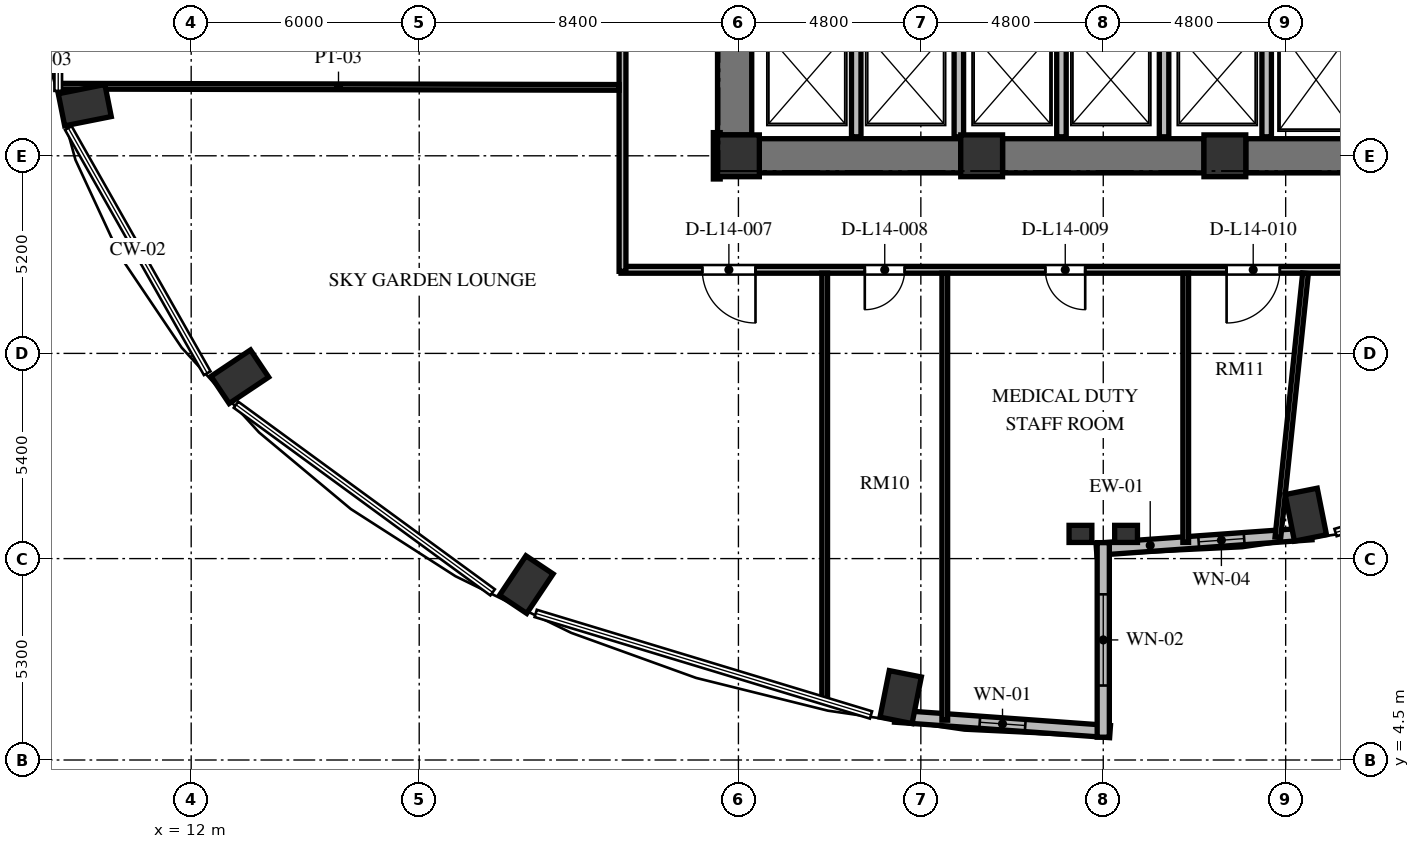
"""IFC4 building model, lengths in metres.
Left out: names, types, materials, properties, quantities, classifications, styles, units other than length and angle.
Written with IfcOpenShell. Run it as: python <this file> out.ifc"""

import sys

from ifc_helpers import new_model, si_unit, direction, frame, frame_2d, origin, origin_2d, place, context, subcontext, project, spatial, rectangle, extrude, element, fill, save


model = new_model("IFC4")
c1 = context("Model", 3, precision=1e-05, world=origin(), true_north=direction((0.0, 1.0)))
c2 = subcontext(c1, "Body", "Model", "MODEL_VIEW")
j1 = project(units=[si_unit("LENGTHUNIT", "METRE"), si_unit("PLANEANGLEUNIT", "RADIAN")], contexts=[c1])
p1 = place(None, origin())
s1 = spatial("IfcSite", under=j1, at=p1, CompositionType="ELEMENT")
p2 = place(p1, origin())
s2 = spatial("IfcBuilding", under=s1, at=p2, CompositionType="ELEMENT")
p3 = place(p2, frame((0.0, 0.0, 58.032)))
s3 = spatial("IfcBuildingStorey", under=s2, at=p3, CompositionType="ELEMENT", Elevation=58.032)
for number, where, z_axis, x_axis in (
    (1, (41.331, 10.956, 0.0), (0.0, 0.0, 1.0), (0.195, -0.981, 0.0)),
    (2, (9.2, 21.732, 0.0), (0.0, 0.0, 1.0), (-0.981, -0.195, 0.0)),
    (3, (13.28, 14.586, 0.0), (0.0, 0.0, 1.0), (-0.831, -0.556, 0.0)),
    (4, (20.819, 9.116, 0.0), (0.0, 0.0, 1.0), (-0.556, -0.831, 0.0)),
    (5, (30.669, 6.156, 0.0), (0.0, 0.0, 1.0), (-0.195, -0.981, 0.0)),
):
    element("IfcColumn", number, at=place(p3, frame(where, z_axis=z_axis, x_axis=x_axis)), inside=s3, PredefinedType="COLUMN", context=c2, shape_type="SweptSolid", body=[
        extrude(rectangle(XDim=1.25, YDim=0.86, at=origin_2d()), origin(), (0.0, 0.0, 1.0), 3.648),
    ])
for number, where, z_axis, x_axis in (
    (6, (26.4, 20.4, 0.0), (0.0, 0.0, 1.0), (1.0, 0.0, 0.0)),
    (7, (32.8, 20.4, 0.0), (0.0, 0.0, 1.0), (1.0, 0.0, 0.0)),
    (8, (39.2, 20.4, 0.0), (0.0, 0.0, 1.0), (1.0, 0.0, 0.0)),
):
    element("IfcColumn", number, at=place(p3, frame(where, z_axis=z_axis, x_axis=x_axis)), inside=s3, PredefinedType="COLUMN", context=c2, shape_type="SweptSolid", body=[
        extrude(rectangle(XDim=1.1, YDim=1.1, at=origin_2d()), origin(), (0.0, 0.0, 1.0), 3.648),
    ])
for number, where, z_axis, x_axis in (
    (9, (35.4, 10.45, 0.0), (0.0, 0.0, 1.0), (1.0, 0.0, 0.0)),
    (10, (36.6, 10.45, 0.0), (0.0, 0.0, 1.0), (1.0, 0.0, 0.0)),
):
    element("IfcColumn", number, at=place(p3, frame(where, z_axis=z_axis, x_axis=x_axis)), inside=s3, PredefinedType="PILASTER", context=c2, shape_type="SweptSolid", body=[
        extrude(rectangle(XDim=0.6, YDim=0.45, at=origin_2d()), origin(), (0.0, 0.0, 1.0), 3.648),
    ])
p4 = place(p3, frame((26.3, 20.95, 0.0), z_axis=(0.0, 0.0, 1.0), x_axis=(0.0, 1.0, 0.0)))
e11 = element("IfcWall", 11, at=p4, inside=s3, PredefinedType="SHEAR", context=c2, shape_type="SweptSolid", body=[
    extrude(rectangle(XDim=14.1, YDim=0.9, at=frame_2d((7.05, 0.0))), origin(), (0.0, 0.0, 1.0), 3.648),
])
p5 = place(p4, frame((6.5, 0.0, 0.0)))
e12 = element("IfcOpeningElement", 12, at=p5, cuts=e11, PredefinedType="OPENING", context=c2, shape_type="SweptSolid", body=[
    extrude(rectangle(XDim=1.2, YDim=2.15, at=frame_2d((0.6, 1.075))), frame((0.0, 0.46, 0.0), z_axis=(0.0, -1.0, 0.0), x_axis=(1.0, 0.0, 0.0)), (0.0, 0.0, 1.0), 0.92),
])
p6 = place(p4, frame((9.6, 0.0, 0.0)))
e13 = element("IfcOpeningElement", 13, at=p6, cuts=e11, PredefinedType="OPENING", context=c2, shape_type="SweptSolid", body=[
    extrude(rectangle(XDim=1.3, YDim=2.2, at=frame_2d((0.65, 1.1))), frame((0.0, 0.46, 0.0), z_axis=(0.0, -1.0, 0.0), x_axis=(1.0, 0.0, 0.0)), (0.0, 0.0, 1.0), 0.92),
])
p7 = place(p4, frame((3.26, 0.0, 0.0)))
e14 = element("IfcOpeningElement", 14, at=p7, cuts=e11, PredefinedType="OPENING", context=c2, shape_type="SweptSolid", body=[
    extrude(rectangle(XDim=1.3, YDim=2.2, at=frame_2d((0.65, 1.1))), frame((0.0, 0.46, 0.0), z_axis=(0.0, -1.0, 0.0), x_axis=(1.0, 0.0, 0.0)), (0.0, 0.0, 1.0), 0.92),
])
p8 = place(p3, frame((26.95, 20.4, 0.0), z_axis=(0.0, 0.0, 1.0), x_axis=(1.0, 0.0, 0.0)))
e15 = element("IfcWall", 15, at=p8, inside=s3, PredefinedType="SHEAR", context=c2, shape_type="SweptSolid", body=[
    extrude(rectangle(XDim=5.3, YDim=0.9, at=frame_2d((2.65, 0.0))), origin(), (0.0, 0.0, 1.0), 3.648),
])
p9 = place(p3, frame((33.35, 20.4, 0.0), z_axis=(0.0, 0.0, 1.0), x_axis=(1.0, 0.0, 0.0)))
e16 = element("IfcWall", 16, at=p9, inside=s3, PredefinedType="SHEAR", context=c2, shape_type="SweptSolid", body=[
    extrude(rectangle(XDim=5.3, YDim=0.9, at=frame_2d((2.65, 0.0))), origin(), (0.0, 0.0, 1.0), 3.648),
])
p10 = place(p3, frame((39.75, 20.4, 0.0), z_axis=(0.0, 0.0, 1.0), x_axis=(1.0, 0.0, 0.0)))
e17 = element("IfcWall", 17, at=p10, inside=s3, PredefinedType="SHEAR", context=c2, shape_type="SweptSolid", body=[
    extrude(rectangle(XDim=5.3, YDim=0.9, at=frame_2d((2.65, 0.0))), origin(), (0.0, 0.0, 1.0), 3.648),
])
p11 = place(p3, frame((35.821, 10.047, 0.0), z_axis=(0.0, 0.0, 1.0), x_axis=(0.997422321809, 0.071754525696, 0.0)))
e18 = element("IfcWall", 18, at=p11, inside=s3, PredefinedType="SOLIDWALL", context=c2, shape_type="SweptSolid", body=[
    extrude(rectangle(XDim=5.675, YDim=0.32, at=frame_2d((2.838, 0.0))), origin(), (0.0, 0.0, 1.0), 3.428),
])
p12 = place(p11, frame((2.697, 0.0, 0.85)))
e19 = element("IfcOpeningElement", 19, at=p12, cuts=e18, PredefinedType="OPENING", context=c2, shape_type="SweptSolid", body=[
    extrude(rectangle(XDim=1.2, YDim=1.8, at=frame_2d((0.6, 0.9))), frame((0.0, 0.17, 0.0), z_axis=(0.0, -1.0, 0.0), x_axis=(1.0, 0.0, 0.0)), (0.0, 0.0, 1.0), 0.34),
])
p13 = place(p3, frame((30.519, 5.654, 0.0), z_axis=(0.0, 0.0, 1.0), x_axis=(0.997421878774, -0.071760683825, 0.0)))
e20 = element("IfcWall", 20, at=p13, inside=s3, PredefinedType="SOLIDWALL", context=c2, shape_type="SweptSolid", body=[
    extrude(rectangle(XDim=5.675, YDim=0.32, at=frame_2d((2.837, 0.0))), origin(), (0.0, 0.0, 1.0), 3.428),
])
p14 = place(p13, frame((2.237, 0.0, 0.85)))
e21 = element("IfcOpeningElement", 21, at=p14, cuts=e20, PredefinedType="OPENING", context=c2, shape_type="SweptSolid", body=[
    extrude(rectangle(XDim=1.2, YDim=2.2, at=frame_2d((0.6, 1.1))), frame((0.0, 0.17, 0.0), z_axis=(0.0, -1.0, 0.0), x_axis=(1.0, 0.0, 0.0)), (0.0, 0.0, 1.0), 0.34),
])
p15 = place(p3, frame((36.0, 5.1, 0.0), z_axis=(0.0, 0.0, 1.0), x_axis=(0.0, 1.0, 0.0)))
e22 = element("IfcWall", 22, at=p15, inside=s3, PredefinedType="SOLIDWALL", context=c2, shape_type="SweptSolid", body=[
    extrude(rectangle(XDim=5.12, YDim=0.32, at=frame_2d((2.56, 0.0))), origin(), (0.0, 0.0, 1.0), 3.428),
])
p16 = place(p15, frame((1.36, 0.0, 0.84)))
e23 = element("IfcOpeningElement", 23, at=p16, cuts=e22, PredefinedType="OPENING", context=c2, shape_type="SweptSolid", body=[
    extrude(rectangle(XDim=2.4, YDim=2.04, at=frame_2d((1.2, 1.02))), frame((0.0, 0.17, 0.0), z_axis=(0.0, -1.0, 0.0), x_axis=(1.0, 0.0, 0.0)), (0.0, 0.0, 1.0), 0.34),
])
for number, where, z_axis, x_axis in (
    (24, (29.5, 20.9, 0.0), (0.0, 0.0, 1.0), (0.0, 1.0, 0.0)),
    (25, (32.2, 20.9, 0.0), (0.0, 0.0, 1.0), (0.0, 1.0, 0.0)),
    (26, (34.9, 20.9, 0.0), (0.0, 0.0, 1.0), (0.0, 1.0, 0.0)),
    (27, (37.6, 20.9, 0.0), (0.0, 0.0, 1.0), (0.0, 1.0, 0.0)),
    (28, (40.3, 20.9, 0.0), (0.0, 0.0, 1.0), (0.0, 1.0, 0.0)),
):
    element("IfcWall", number, at=place(p3, frame(where, z_axis=z_axis, x_axis=x_axis)), inside=s3, PredefinedType="SOLIDWALL", context=c2, shape_type="SweptSolid", body=[
        extrude(rectangle(XDim=2.8, YDim=0.25, at=frame_2d((1.4, 0.0))), origin(), (0.0, 0.0, 1.0), 3.428),
    ])
p17 = place(p3, frame((25.83, 21.01, 0.0), z_axis=(0.0, 0.0, 1.0), x_axis=(0.0, -1.0, 0.0)))
e29 = element("IfcWall", 29, at=p17, inside=s3, PredefinedType="PARTITIONING", context=c2, shape_type="SweptSolid", body=[
    extrude(rectangle(XDim=1.22, YDim=0.18, at=frame_2d((0.61, 0.0))), origin(), (0.0, 0.0, 1.0), 3.428),
])
p18 = place(p3, frame((45.24, 17.4, 0.0), z_axis=(0.0, 0.0, 1.0), x_axis=(-1.0, 0.0, 0.0)))
e30 = element("IfcWall", 30, at=p18, inside=s3, PredefinedType="PARTITIONING", context=c2, shape_type="SweptSolid", body=[
    extrude(rectangle(XDim=21.93, YDim=0.18, at=frame_2d((10.965, 0.0))), origin(), (0.0, 0.0, 1.0), 3.053),
])
p19 = place(p18, frame((18.391, 0.0, 0.0)))
e31 = element("IfcOpeningElement", 31, at=p19, cuts=e30, PredefinedType="OPENING", context=c2, shape_type="SweptSolid", body=[
    extrude(rectangle(XDim=1.4, YDim=2.2, at=frame_2d((0.7, 1.1))), frame((0.0, 0.1, 0.0), z_axis=(0.0, -1.0, 0.0), x_axis=(1.0, 0.0, 0.0)), (0.0, 0.0, 1.0), 0.2),
])
p20 = place(p18, frame((14.465, 0.0, 0.0)))
e32 = element("IfcOpeningElement", 32, at=p20, cuts=e30, PredefinedType="OPENING", context=c2, shape_type="SweptSolid", body=[
    extrude(rectangle(XDim=1.05, YDim=2.15, at=frame_2d((0.525, 1.075))), frame((0.0, 0.1, 0.0), z_axis=(0.0, -1.0, 0.0), x_axis=(1.0, 0.0, 0.0)), (0.0, 0.0, 1.0), 0.2),
])
p21 = place(p18, frame((9.715, 0.0, 0.0)))
e33 = element("IfcOpeningElement", 33, at=p21, cuts=e30, PredefinedType="OPENING", context=c2, shape_type="SweptSolid", body=[
    extrude(rectangle(XDim=1.05, YDim=2.15, at=frame_2d((0.525, 1.075))), frame((0.0, 0.1, 0.0), z_axis=(0.0, -1.0, 0.0), x_axis=(1.0, 0.0, 0.0)), (0.0, 0.0, 1.0), 0.2),
])
p22 = place(p18, frame((4.594, 0.0, 0.0)))
e34 = element("IfcOpeningElement", 34, at=p22, cuts=e30, PredefinedType="OPENING", context=c2, shape_type="SweptSolid", body=[
    extrude(rectangle(XDim=1.4, YDim=2.2, at=frame_2d((0.7, 1.1))), frame((0.0, 0.1, 0.0), z_axis=(0.0, -1.0, 0.0), x_axis=(1.0, 0.0, 0.0)), (0.0, 0.0, 1.0), 0.2),
])
p23 = place(p3, frame((23.35, 17.36, 0.0), z_axis=(0.0, 0.0, 1.0), x_axis=(0.0, 1.0, 0.0)))
e35 = element("IfcWall", 35, at=p23, inside=s3, PredefinedType="PARTITIONING", context=c2, shape_type="SweptSolid", body=[
    extrude(rectangle(XDim=9.28, YDim=0.18, at=frame_2d((4.64, 0.0))), origin(), (0.0, 0.0, 1.0), 3.428),
])
p24 = place(p3, frame((8.493, 22.231, 0.0), z_axis=(0.0, 0.0, 1.0), x_axis=(0.999997760873, -0.002116187438, 0.0)))
e36 = element("IfcWall", 36, at=p24, inside=s3, PredefinedType="PARTITIONING", context=c2, shape_type="SweptSolid", body=[
    extrude(rectangle(XDim=14.767, YDim=0.15, at=frame_2d((7.384, 0.0))), origin(), (0.0, 0.0, 1.0), 3.428),
])
p25 = place(p3, frame((28.67, 6.067, 0.0), z_axis=(0.0, 0.0, 1.0), x_axis=(0.0, 1.0, 0.0)))
e37 = element("IfcWall", 37, at=p25, inside=s3, PredefinedType="PARTITIONING", context=c2, shape_type="SweptSolid", body=[
    extrude(rectangle(XDim=11.243, YDim=0.15, at=frame_2d((5.622, 0.0))), origin(), (0.0, 0.0, 1.0), 3.428),
])
p26 = place(p3, frame((31.83, 5.548, 0.0), z_axis=(0.0, 0.0, 1.0), x_axis=(0.0, 1.0, 0.0)))
e38 = element("IfcWall", 38, at=p26, inside=s3, PredefinedType="PARTITIONING", context=c2, shape_type="SweptSolid", body=[
    extrude(rectangle(XDim=11.762, YDim=0.15, at=frame_2d((5.881, 0.0))), origin(), (0.0, 0.0, 1.0), 2.813),
])
p27 = place(p3, frame((38.17, 10.227, 0.0), z_axis=(0.0, 0.0, 1.0), x_axis=(0.0, 1.0, 0.0)))
e39 = element("IfcWall", 39, at=p27, inside=s3, PredefinedType="PARTITIONING", context=c2, shape_type="SweptSolid", body=[
    extrude(rectangle(XDim=7.083, YDim=0.15, at=frame_2d((3.542, 0.0))), origin(), (0.0, 0.0, 1.0), 3.428),
])
p28 = place(p3, frame((40.595, 10.359, 0.0), z_axis=(0.0, 0.0, 1.0), x_axis=(0.104057453244, 0.994571287754, 0.0)))
e40 = element("IfcWall", 40, at=p28, inside=s3, PredefinedType="PARTITIONING", context=c2, shape_type="SweptSolid", body=[
    extrude(rectangle(XDim=6.989, YDim=0.15, at=frame_2d((3.495, 0.0))), origin(), (0.0, 0.0, 1.0), 3.428),
])
p29 = place(p12, origin())
e41 = element("IfcWindow", 41, at=p29, inside=s3, PartitioningType="SINGLE_PANEL", PredefinedType="WINDOW", context=c2, shape_type="SweptSolid", body=[
    extrude(rectangle(XDim=1.2, YDim=1.8, at=frame_2d((0.6, 0.9))), frame((0.0, 0.03, 0.0), z_axis=(0.0, -1.0, 0.0), x_axis=(1.0, 0.0, 0.0)), (0.0, 0.0, 1.0), 0.06),
])
fill(e19, e41)
p30 = place(p14, origin())
e42 = element("IfcWindow", 42, at=p30, inside=s3, PartitioningType="SINGLE_PANEL", PredefinedType="WINDOW", context=c2, shape_type="SweptSolid", body=[
    extrude(rectangle(XDim=1.2, YDim=2.2, at=frame_2d((0.6, 1.1))), frame((0.0, 0.03, 0.0), z_axis=(0.0, -1.0, 0.0), x_axis=(1.0, 0.0, 0.0)), (0.0, 0.0, 1.0), 0.06),
])
fill(e21, e42)
p31 = place(p16, origin())
e43 = element("IfcWindow", 43, at=p31, inside=s3, PartitioningType="SINGLE_PANEL", PredefinedType="WINDOW", context=c2, shape_type="SweptSolid", body=[
    extrude(rectangle(XDim=2.4, YDim=2.04, at=frame_2d((1.2, 1.02))), frame((0.0, 0.03, 0.0), z_axis=(0.0, -1.0, 0.0), x_axis=(1.0, 0.0, 0.0)), (0.0, 0.0, 1.0), 0.06),
])
fill(e23, e43)
p32 = place(p19, origin())
e44 = element("IfcDoor", 44, at=p32, inside=s3, OperationType="SINGLE_SWING_LEFT", PredefinedType="DOOR", context=c2, shape_type="SweptSolid", body=[
    extrude(rectangle(XDim=1.4, YDim=2.2, at=frame_2d((0.7, 1.1))), frame((0.0, 0.025, 0.0), z_axis=(0.0, -1.0, 0.0), x_axis=(1.0, 0.0, 0.0)), (0.0, 0.0, 1.0), 0.05),
])
fill(e31, e44)
p33 = place(p20, origin())
e45 = element("IfcDoor", 45, at=p33, inside=s3, OperationType="SINGLE_SWING_RIGHT", PredefinedType="DOOR", context=c2, shape_type="SweptSolid", body=[
    extrude(rectangle(XDim=1.05, YDim=2.15, at=frame_2d((0.525, 1.075))), frame((0.0, 0.025, 0.0), z_axis=(0.0, -1.0, 0.0), x_axis=(1.0, 0.0, 0.0)), (0.0, 0.0, 1.0), 0.05),
])
fill(e32, e45)
p34 = place(p21, origin())
e46 = element("IfcDoor", 46, at=p34, inside=s3, OperationType="SINGLE_SWING_LEFT", PredefinedType="DOOR", context=c2, shape_type="SweptSolid", body=[
    extrude(rectangle(XDim=1.05, YDim=2.15, at=frame_2d((0.525, 1.075))), frame((0.0, 0.025, 0.0), z_axis=(0.0, -1.0, 0.0), x_axis=(1.0, 0.0, 0.0)), (0.0, 0.0, 1.0), 0.05),
])
fill(e33, e46)
p35 = place(p22, origin())
e47 = element("IfcDoor", 47, at=p35, inside=s3, OperationType="SINGLE_SWING_RIGHT", PredefinedType="DOOR", context=c2, shape_type="SweptSolid", body=[
    extrude(rectangle(XDim=1.4, YDim=2.2, at=frame_2d((0.7, 1.1))), frame((0.0, 0.025, 0.0), z_axis=(0.0, -1.0, 0.0), x_axis=(1.0, 0.0, 0.0)), (0.0, 0.0, 1.0), 0.05),
])
fill(e34, e47)
save(model, sys.argv[1])
